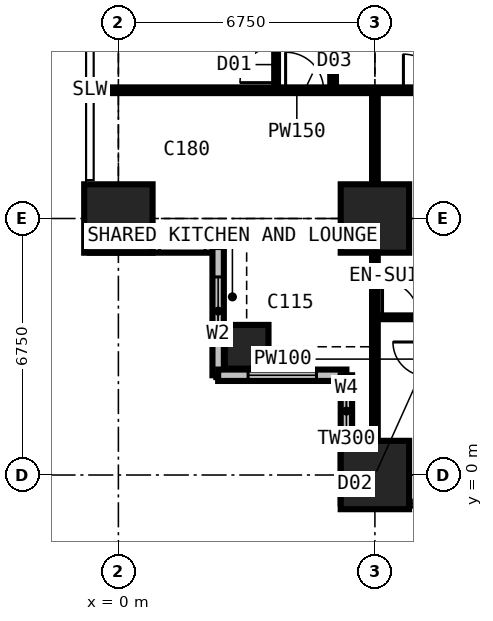
"""IFC4 building model, lengths in metres.
Left out: names, types, materials, properties, quantities, classifications, styles, units other than length and angle.
Written with IfcOpenShell. Run it as: python <this file> out.ifc"""

import sys

from ifc_helpers import new_model, si_unit, direction, frame, frame_2d, origin, origin_2d, place, context, subcontext, project, spatial, rectangle, extrude, element, fill, save


model = new_model("IFC4")
c1 = context("Model", 3, precision=1e-05, world=origin(), true_north=direction((0.0, 1.0)))
c2 = subcontext(c1, "Body", "Model", "MODEL_VIEW")
j1 = project(units=[si_unit("LENGTHUNIT", "METRE"), si_unit("PLANEANGLEUNIT", "RADIAN")], contexts=[c1])
p1 = place(None, origin())
s1 = spatial("IfcSite", under=j1, at=p1, CompositionType="ELEMENT")
p2 = place(p1, origin())
s2 = spatial("IfcBuilding", under=s1, at=p2, CompositionType="ELEMENT")
p3 = place(p2, frame((0.0, 0.0, 46.8)))
s3 = spatial("IfcBuildingStorey", under=s2, at=p3, CompositionType="ELEMENT", Elevation=46.8)
p4 = place(p3, frame((0.0, 6.75, 0.0), z_axis=(0.0, 0.0, 1.0), x_axis=(1.0, 0.0, 0.0)))
e1 = element("IfcColumn", 1, at=p4, inside=s3, PredefinedType="COLUMN", context=c2, shape_type="SweptSolid", body=[
    extrude(rectangle(XDim=1.8, YDim=1.8, at=origin_2d()), origin(), (0.0, 0.0, 1.0), 3.6),
])
p5 = place(p3, frame((3.375, 3.375, 0.0), z_axis=(0.0, 0.0, 1.0), x_axis=(1.0, 0.0, 0.0)))
e2 = element("IfcColumn", 2, at=p5, inside=s3, PredefinedType="COLUMN", context=c2, shape_type="SweptSolid", body=[
    extrude(rectangle(XDim=1.15, YDim=1.15, at=origin_2d()), origin(), (0.0, 0.0, 1.0), 3.6),
])
for number, where, z_axis, x_axis in (
    (3, (6.75, 0.0, 0.0), (0.0, 0.0, 1.0), (1.0, 0.0, 0.0)),
    (4, (6.75, 6.75, 0.0), (0.0, 0.0, 1.0), (1.0, 0.0, 0.0)),
):
    element("IfcColumn", number, at=place(p3, frame(where, z_axis=z_axis, x_axis=x_axis)), inside=s3, PredefinedType="COLUMN", context=c2, shape_type="SweptSolid", body=[
        extrude(rectangle(XDim=1.8, YDim=1.8, at=origin_2d()), origin(), (0.0, 0.0, 1.0), 3.6),
    ])
p6 = place(p3, frame((-0.75, 6.0, 0.0), z_axis=(0.0, 0.0, 1.0), x_axis=(1.0, 0.0, 0.0)))
e5 = element("IfcWall", 5, at=p6, inside=s3, PredefinedType="SOLIDWALL", context=c2, shape_type="SweptSolid", body=[
    extrude(rectangle(XDim=3.375, YDim=0.3, at=frame_2d((1.688, 0.0))), origin(), (0.0, 0.0, 1.0), 3.375),
])
p7 = place(p6, frame((1.833, 0.0, 0.9)))
e6 = element("IfcOpeningElement", 6, at=p7, cuts=e5, PredefinedType="OPENING", context=c2, shape_type="SweptSolid", body=[
    extrude(rectangle(XDim=1.2, YDim=1.8, at=frame_2d((0.6, 0.9))), frame((0.0, 0.16, 0.0), z_axis=(0.0, -1.0, 0.0), x_axis=(1.0, 0.0, 0.0)), (0.0, 0.0, 1.0), 0.32),
])
p8 = place(p3, frame((2.625, 6.0, 0.0), z_axis=(0.0, 0.0, 1.0), x_axis=(0.0, -1.0, 0.0)))
e7 = element("IfcWall", 7, at=p8, inside=s3, PredefinedType="SOLIDWALL", context=c2, shape_type="SweptSolid", body=[
    extrude(rectangle(XDim=3.375, YDim=0.3, at=frame_2d((1.688, 0.0))), origin(), (0.0, 0.0, 1.0), 3.375),
])
p9 = place(p8, frame((0.788, 0.0, 0.6)))
e8 = element("IfcOpeningElement", 8, at=p9, cuts=e7, PredefinedType="OPENING", context=c2, shape_type="SweptSolid", body=[
    extrude(rectangle(XDim=1.8, YDim=2.1, at=frame_2d((0.9, 1.05))), frame((0.0, 0.16, 0.0), z_axis=(0.0, -1.0, 0.0), x_axis=(1.0, 0.0, 0.0)), (0.0, 0.0, 1.0), 0.32),
])
p10 = place(p3, frame((2.625, 2.625, 0.0), z_axis=(0.0, 0.0, 1.0), x_axis=(1.0, 0.0, 0.0)))
e9 = element("IfcWall", 9, at=p10, inside=s3, PredefinedType="SOLIDWALL", context=c2, shape_type="SweptSolid", body=[
    extrude(rectangle(XDim=3.375, YDim=0.3, at=frame_2d((1.688, 0.0))), origin(), (0.0, 0.0, 1.0), 3.375),
])
p11 = place(p10, frame((0.788, 0.0, 0.6)))
e10 = element("IfcOpeningElement", 10, at=p11, cuts=e9, PredefinedType="OPENING", context=c2, shape_type="SweptSolid", body=[
    extrude(rectangle(XDim=1.8, YDim=2.1, at=frame_2d((0.9, 1.05))), frame((0.0, 0.16, 0.0), z_axis=(0.0, -1.0, 0.0), x_axis=(1.0, 0.0, 0.0)), (0.0, 0.0, 1.0), 0.32),
])
p12 = place(p3, frame((6.0, 2.625, 0.0), z_axis=(0.0, 0.0, 1.0), x_axis=(0.0, -1.0, 0.0)))
e11 = element("IfcWall", 11, at=p12, inside=s3, PredefinedType="SOLIDWALL", context=c2, shape_type="SweptSolid", body=[
    extrude(rectangle(XDim=3.375, YDim=0.3, at=frame_2d((1.688, 0.0))), origin(), (0.0, 0.0, 1.0), 3.375),
])
p13 = place(p12, frame((0.343, 0.0, 0.9)))
e12 = element("IfcOpeningElement", 12, at=p13, cuts=e11, PredefinedType="OPENING", context=c2, shape_type="SweptSolid", body=[
    extrude(rectangle(XDim=1.2, YDim=1.8, at=frame_2d((0.6, 0.9))), frame((0.0, 0.16, 0.0), z_axis=(0.0, -1.0, 0.0), x_axis=(1.0, 0.0, 0.0)), (0.0, 0.0, 1.0), 0.32),
])
p14 = place(p3, frame((-0.734, 10.125, 0.0), z_axis=(0.0, 0.0, 1.0), x_axis=(1.0, 0.0, 0.0)))
e13 = element("IfcWall", 13, at=p14, inside=s3, PredefinedType="PARTITIONING", context=c2, shape_type="SweptSolid", body=[
    extrude(rectangle(XDim=10.859, YDim=0.15, at=frame_2d((5.429, 0.0))), origin(), (0.0, 0.0, 1.0), 3.375),
])
p15 = place(p14, frame((5.134, 0.0, 0.0)))
e14 = element("IfcOpeningElement", 14, at=p15, cuts=e13, PredefinedType="OPENING", context=c2, shape_type="SweptSolid", body=[
    extrude(rectangle(XDim=1.0, YDim=2.2, at=frame_2d((0.5, 1.1))), frame((0.0, 0.085, 0.0), z_axis=(0.0, -1.0, 0.0), x_axis=(1.0, 0.0, 0.0)), (0.0, 0.0, 1.0), 0.17),
])
p16 = place(p14, frame((8.234, 0.0, 0.0)))
e15 = element("IfcOpeningElement", 15, at=p16, cuts=e13, PredefinedType="OPENING", context=c2, shape_type="SweptSolid", body=[
    extrude(rectangle(XDim=0.95, YDim=2.2, at=frame_2d((0.475, 1.1))), frame((0.0, 0.085, 0.0), z_axis=(0.0, -1.0, 0.0), x_axis=(1.0, 0.0, 0.0)), (0.0, 0.0, 1.0), 0.17),
])
p17 = place(p3, frame((4.15, 10.125, 0.0), z_axis=(0.0, 0.0, 1.0), x_axis=(0.0, 1.0, 0.0)))
e16 = element("IfcWall", 16, at=p17, inside=s3, PredefinedType="PARTITIONING", context=c2, shape_type="SweptSolid", body=[
    extrude(rectangle(XDim=23.625, YDim=0.1, at=frame_2d((11.812, 0.0))), origin(), (0.0, 0.0, 1.0), 3.375),
])
p18 = place(p17, frame((0.2, 0.0, 0.0)))
e17 = element("IfcOpeningElement", 17, at=p18, cuts=e16, PredefinedType="OPENING", context=c2, shape_type="SweptSolid", body=[
    extrude(rectangle(XDim=0.95, YDim=2.2, at=frame_2d((0.475, 1.1))), frame((0.0, 0.06, 0.0), z_axis=(0.0, -1.0, 0.0), x_axis=(1.0, 0.0, 0.0)), (0.0, 0.0, 1.0), 0.12),
])
p19 = place(p17, frame((3.625, 0.0, 0.0)))
e18 = element("IfcOpeningElement", 18, at=p19, cuts=e16, PredefinedType="OPENING", context=c2, shape_type="SweptSolid", body=[
    extrude(rectangle(XDim=0.95, YDim=2.2, at=frame_2d((0.475, 1.1))), frame((0.0, 0.06, 0.0), z_axis=(0.0, -1.0, 0.0), x_axis=(1.0, 0.0, 0.0)), (0.0, 0.0, 1.0), 0.12),
])
p20 = place(p17, frame((7.0, 0.0, 0.0)))
e19 = element("IfcOpeningElement", 19, at=p20, cuts=e16, PredefinedType="OPENING", context=c2, shape_type="SweptSolid", body=[
    extrude(rectangle(XDim=0.95, YDim=2.2, at=frame_2d((0.475, 1.1))), frame((0.0, 0.06, 0.0), z_axis=(0.0, -1.0, 0.0), x_axis=(1.0, 0.0, 0.0)), (0.0, 0.0, 1.0), 0.12),
])
p21 = place(p17, frame((10.375, 0.0, 0.0)))
e20 = element("IfcOpeningElement", 20, at=p21, cuts=e16, PredefinedType="OPENING", context=c2, shape_type="SweptSolid", body=[
    extrude(rectangle(XDim=0.95, YDim=2.2, at=frame_2d((0.475, 1.1))), frame((0.0, 0.06, 0.0), z_axis=(0.0, -1.0, 0.0), x_axis=(1.0, 0.0, 0.0)), (0.0, 0.0, 1.0), 0.12),
])
p22 = place(p17, frame((13.75, 0.0, 0.0)))
e21 = element("IfcOpeningElement", 21, at=p22, cuts=e16, PredefinedType="OPENING", context=c2, shape_type="SweptSolid", body=[
    extrude(rectangle(XDim=0.95, YDim=2.2, at=frame_2d((0.475, 1.1))), frame((0.0, 0.06, 0.0), z_axis=(0.0, -1.0, 0.0), x_axis=(1.0, 0.0, 0.0)), (0.0, 0.0, 1.0), 0.12),
])
p23 = place(p17, frame((17.125, 0.0, 0.0)))
e22 = element("IfcOpeningElement", 22, at=p23, cuts=e16, PredefinedType="OPENING", context=c2, shape_type="SweptSolid", body=[
    extrude(rectangle(XDim=0.95, YDim=2.2, at=frame_2d((0.475, 1.1))), frame((0.0, 0.06, 0.0), z_axis=(0.0, -1.0, 0.0), x_axis=(1.0, 0.0, 0.0)), (0.0, 0.0, 1.0), 0.12),
])
p24 = place(p17, frame((20.5, 0.0, 0.0)))
e23 = element("IfcOpeningElement", 23, at=p24, cuts=e16, PredefinedType="OPENING", context=c2, shape_type="SweptSolid", body=[
    extrude(rectangle(XDim=0.95, YDim=2.2, at=frame_2d((0.475, 1.1))), frame((0.0, 0.06, 0.0), z_axis=(0.0, -1.0, 0.0), x_axis=(1.0, 0.0, 0.0)), (0.0, 0.0, 1.0), 0.12),
])
p25 = place(p3, frame((5.65, 10.125, 0.0), z_axis=(0.0, 0.0, 1.0), x_axis=(0.0, 1.0, 0.0)))
e24 = element("IfcWall", 24, at=p25, inside=s3, PredefinedType="PARTITIONING", context=c2, shape_type="SweptSolid", body=[
    extrude(rectangle(XDim=10.762, YDim=0.15, at=frame_2d((5.381, 0.0))), origin(), (0.0, 0.0, 1.0), 3.375),
])
p26 = place(p3, frame((6.75, -0.734, 0.0), z_axis=(0.0, 0.0, 1.0), x_axis=(0.0, 1.0, 0.0)))
e25 = element("IfcWall", 25, at=p26, inside=s3, PredefinedType="PARTITIONING", context=c2, shape_type="SweptSolid", body=[
    extrude(rectangle(XDim=10.859, YDim=0.15, at=frame_2d((5.429, 0.0))), origin(), (0.0, 0.0, 1.0), 2.877),
])
p27 = place(p3, frame((6.75, 4.15, 0.0), z_axis=(0.0, 0.0, 1.0), x_axis=(1.0, 0.0, 0.0)))
e26 = element("IfcWall", 26, at=p27, inside=s3, PredefinedType="PARTITIONING", context=c2, shape_type="SweptSolid", body=[
    extrude(rectangle(XDim=23.625, YDim=0.1, at=frame_2d((11.812, 0.0))), origin(), (0.0, 0.0, 1.0), 3.375),
])
p28 = place(p27, frame((0.2, 0.0, 0.0)))
e27 = element("IfcOpeningElement", 27, at=p28, cuts=e26, PredefinedType="OPENING", context=c2, shape_type="SweptSolid", body=[
    extrude(rectangle(XDim=0.95, YDim=2.2, at=frame_2d((0.475, 1.1))), frame((0.0, 0.06, 0.0), z_axis=(0.0, -1.0, 0.0), x_axis=(1.0, 0.0, 0.0)), (0.0, 0.0, 1.0), 0.12),
])
p29 = place(p27, frame((3.625, 0.0, 0.0)))
e28 = element("IfcOpeningElement", 28, at=p29, cuts=e26, PredefinedType="OPENING", context=c2, shape_type="SweptSolid", body=[
    extrude(rectangle(XDim=0.95, YDim=2.2, at=frame_2d((0.475, 1.1))), frame((0.0, 0.06, 0.0), z_axis=(0.0, -1.0, 0.0), x_axis=(1.0, 0.0, 0.0)), (0.0, 0.0, 1.0), 0.12),
])
p30 = place(p27, frame((7.0, 0.0, 0.0)))
e29 = element("IfcOpeningElement", 29, at=p30, cuts=e26, PredefinedType="OPENING", context=c2, shape_type="SweptSolid", body=[
    extrude(rectangle(XDim=0.95, YDim=2.2, at=frame_2d((0.475, 1.1))), frame((0.0, 0.06, 0.0), z_axis=(0.0, -1.0, 0.0), x_axis=(1.0, 0.0, 0.0)), (0.0, 0.0, 1.0), 0.12),
])
p31 = place(p27, frame((10.375, 0.0, 0.0)))
e30 = element("IfcOpeningElement", 30, at=p31, cuts=e26, PredefinedType="OPENING", context=c2, shape_type="SweptSolid", body=[
    extrude(rectangle(XDim=0.95, YDim=2.2, at=frame_2d((0.475, 1.1))), frame((0.0, 0.06, 0.0), z_axis=(0.0, -1.0, 0.0), x_axis=(1.0, 0.0, 0.0)), (0.0, 0.0, 1.0), 0.12),
])
p32 = place(p27, frame((13.75, 0.0, 0.0)))
e31 = element("IfcOpeningElement", 31, at=p32, cuts=e26, PredefinedType="OPENING", context=c2, shape_type="SweptSolid", body=[
    extrude(rectangle(XDim=0.95, YDim=2.2, at=frame_2d((0.475, 1.1))), frame((0.0, 0.06, 0.0), z_axis=(0.0, -1.0, 0.0), x_axis=(1.0, 0.0, 0.0)), (0.0, 0.0, 1.0), 0.12),
])
p33 = place(p27, frame((17.125, 0.0, 0.0)))
e32 = element("IfcOpeningElement", 32, at=p33, cuts=e26, PredefinedType="OPENING", context=c2, shape_type="SweptSolid", body=[
    extrude(rectangle(XDim=0.95, YDim=2.2, at=frame_2d((0.475, 1.1))), frame((0.0, 0.06, 0.0), z_axis=(0.0, -1.0, 0.0), x_axis=(1.0, 0.0, 0.0)), (0.0, 0.0, 1.0), 0.12),
])
p34 = place(p27, frame((20.5, 0.0, 0.0)))
e33 = element("IfcOpeningElement", 33, at=p34, cuts=e26, PredefinedType="OPENING", context=c2, shape_type="SweptSolid", body=[
    extrude(rectangle(XDim=0.95, YDim=2.2, at=frame_2d((0.475, 1.1))), frame((0.0, 0.06, 0.0), z_axis=(0.0, -1.0, 0.0), x_axis=(1.0, 0.0, 0.0)), (0.0, 0.0, 1.0), 0.12),
])
p35 = place(p7, origin())
e34 = element("IfcWindow", 34, at=p35, inside=s3, PartitioningType="SINGLE_PANEL", PredefinedType="WINDOW", context=c2, shape_type="SweptSolid", body=[
    extrude(rectangle(XDim=1.2, YDim=1.8, at=frame_2d((0.6, 0.9))), frame((0.0, 0.03, 0.0), z_axis=(0.0, -1.0, 0.0), x_axis=(1.0, 0.0, 0.0)), (0.0, 0.0, 1.0), 0.06),
])
fill(e6, e34)
p36 = place(p9, origin())
e35 = element("IfcWindow", 35, at=p36, inside=s3, PartitioningType="SINGLE_PANEL", PredefinedType="WINDOW", context=c2, shape_type="SweptSolid", body=[
    extrude(rectangle(XDim=1.8, YDim=2.1, at=frame_2d((0.9, 1.05))), frame((0.0, 0.03, 0.0), z_axis=(0.0, -1.0, 0.0), x_axis=(1.0, 0.0, 0.0)), (0.0, 0.0, 1.0), 0.06),
])
fill(e8, e35)
p37 = place(p11, origin())
e36 = element("IfcWindow", 36, at=p37, inside=s3, PartitioningType="SINGLE_PANEL", PredefinedType="WINDOW", context=c2, shape_type="SweptSolid", body=[
    extrude(rectangle(XDim=1.8, YDim=2.1, at=frame_2d((0.9, 1.05))), frame((0.0, 0.03, 0.0), z_axis=(0.0, -1.0, 0.0), x_axis=(1.0, 0.0, 0.0)), (0.0, 0.0, 1.0), 0.06),
])
fill(e10, e36)
p38 = place(p13, origin())
e37 = element("IfcWindow", 37, at=p38, inside=s3, PartitioningType="SINGLE_PANEL", PredefinedType="WINDOW", context=c2, shape_type="SweptSolid", body=[
    extrude(rectangle(XDim=1.2, YDim=1.8, at=frame_2d((0.6, 0.9))), frame((0.0, 0.03, 0.0), z_axis=(0.0, -1.0, 0.0), x_axis=(1.0, 0.0, 0.0)), (0.0, 0.0, 1.0), 0.06),
])
fill(e12, e37)
p39 = place(p28, origin())
e38 = element("IfcDoor", 38, at=p39, inside=s3, OperationType="SINGLE_SWING_LEFT", PredefinedType="DOOR", context=c2, shape_type="SweptSolid", body=[
    extrude(rectangle(XDim=0.95, YDim=2.2, at=frame_2d((0.475, 1.1))), frame((0.0, 0.025, 0.0), z_axis=(0.0, -1.0, 0.0), x_axis=(1.0, 0.0, 0.0)), (0.0, 0.0, 1.0), 0.05),
])
fill(e27, e38)
p40 = place(p15, origin())
e39 = element("IfcDoor", 39, at=p40, inside=s3, OperationType="SINGLE_SWING_LEFT", PredefinedType="DOOR", context=c2, shape_type="SweptSolid", body=[
    extrude(rectangle(XDim=1.0, YDim=2.2, at=frame_2d((0.5, 1.1))), frame((0.0, 0.025, 0.0), z_axis=(0.0, -1.0, 0.0), x_axis=(1.0, 0.0, 0.0)), (0.0, 0.0, 1.0), 0.05),
])
fill(e14, e39)
p41 = place(p18, origin())
e40 = element("IfcDoor", 40, at=p41, inside=s3, OperationType="SINGLE_SWING_LEFT", PredefinedType="DOOR", context=c2, shape_type="SweptSolid", body=[
    extrude(rectangle(XDim=0.95, YDim=2.2, at=frame_2d((0.475, 1.1))), frame((0.0, 0.025, 0.0), z_axis=(0.0, -1.0, 0.0), x_axis=(1.0, 0.0, 0.0)), (0.0, 0.0, 1.0), 0.05),
])
fill(e17, e40)
p42 = place(p16, origin())
e41 = element("IfcDoor", 41, at=p42, inside=s3, OperationType="SINGLE_SWING_LEFT", PredefinedType="DOOR", context=c2, shape_type="SweptSolid", body=[
    extrude(rectangle(XDim=0.95, YDim=2.2, at=frame_2d((0.475, 1.1))), frame((0.0, 0.025, 0.0), z_axis=(0.0, -1.0, 0.0), x_axis=(1.0, 0.0, 0.0)), (0.0, 0.0, 1.0), 0.05),
])
fill(e15, e41)
save(model, sys.argv[1])
